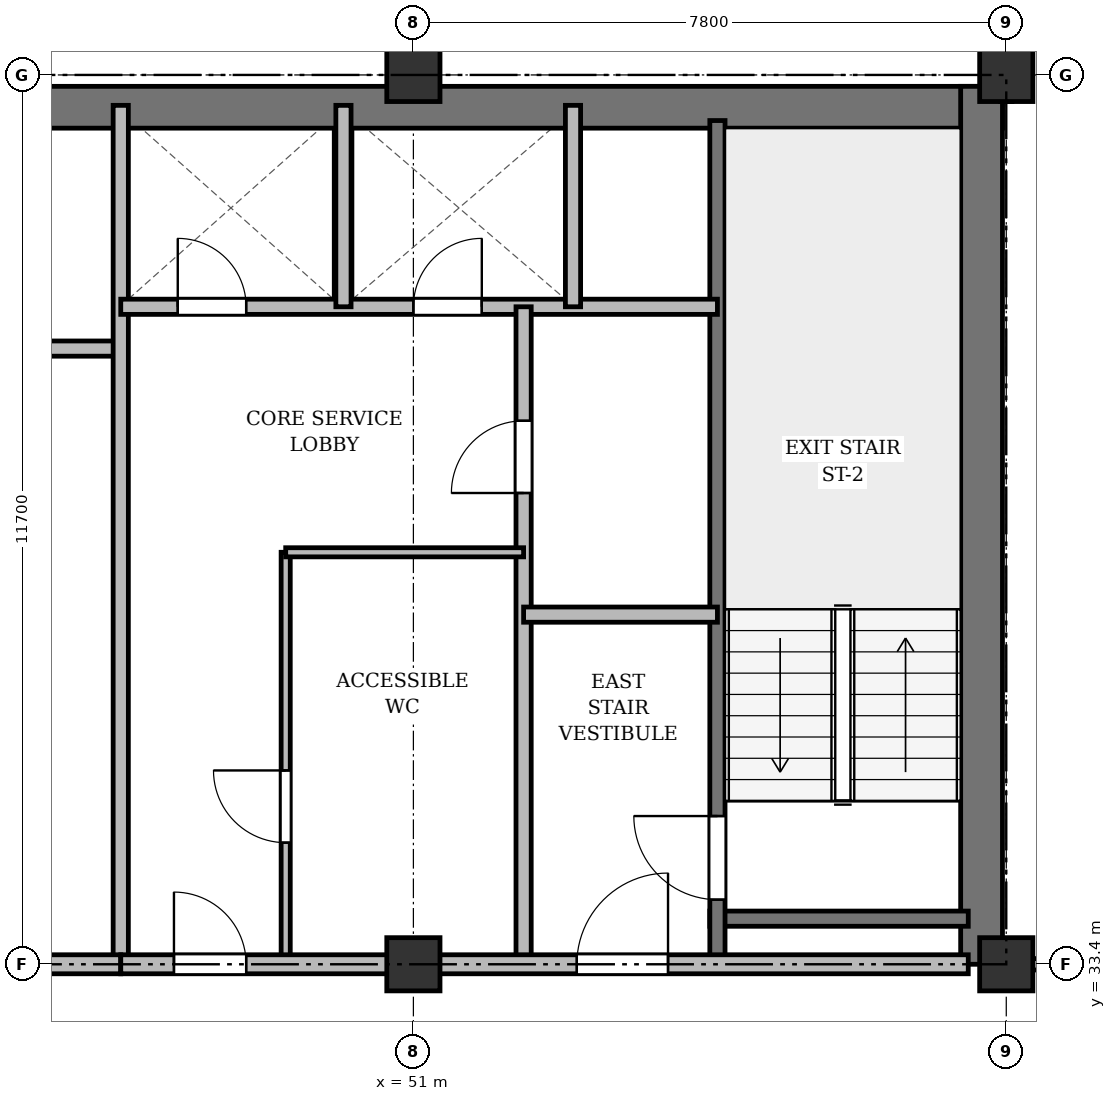
"""IFC4 building model, lengths in metres.
Left out: names, types, materials, properties, quantities, classifications, styles, units other than length and angle.
Written with IfcOpenShell. Run it as: python <this file> out.ifc"""

import sys

from ifc_helpers import new_model, si_unit, direction, frame, frame_2d, origin, origin_2d, place, context, subcontext, project, spatial, rectangle, extrude, source, transform, mapped, element, fill, save


model = new_model("IFC4")
c1 = context("Model", 3, precision=1e-05, world=origin(), true_north=direction((0.0, 1.0)))
c2 = subcontext(c1, "Body", "Model", "MODEL_VIEW")
j1 = project(units=[si_unit("LENGTHUNIT", "METRE"), si_unit("PLANEANGLEUNIT", "RADIAN")], contexts=[c1])
p1 = place(None, origin())
s1 = spatial("IfcSite", under=j1, at=p1, CompositionType="ELEMENT")
p2 = place(p1, origin())
s2 = spatial("IfcBuilding", under=s1, at=p2, CompositionType="ELEMENT")
p3 = place(p2, frame((0.0, 0.0, 146.5)))
s3 = spatial("IfcBuildingStorey", under=s2, at=p3, CompositionType="ELEMENT", Elevation=146.5)
m1 = source(origin(), c2, "Body", "SweptSolid", [
    extrude(rectangle(XDim=0.7, YDim=0.7, at=origin_2d()), origin(), (0.0, 0.0, 1.0), 3.6),
])
for number, where, z_axis, x_axis in (
    (1, (51.0, 33.4, 0.0), (0.0, 0.0, 1.0), (1.0, 0.0, 0.0)),
    (2, (51.0, 45.1, 0.0), (0.0, 0.0, 1.0), (1.0, 0.0, 0.0)),
    (3, (58.8, 33.4, 0.0), (0.0, 0.0, 1.0), (1.0, 0.0, 0.0)),
    (4, (58.8, 45.1, 0.0), (0.0, 0.0, 1.0), (1.0, 0.0, 0.0)),
):
    element("IfcColumn", number, at=place(p3, frame(where, z_axis=z_axis, x_axis=x_axis)), inside=s3, PredefinedType="COLUMN", context=c2, shape_type="MappedRepresentation", body=[
        mapped(m1, transform((0.0, 0.0, 0.0), x_axis=(1.0, 0.0, 0.0), y_axis=(0.0, 1.0, 0.0), z_axis=(0.0, 0.0, 1.0), scale=1.0)),
    ])
p4 = place(p3, frame((15.65, 44.675, 0.0), z_axis=(0.0, 0.0, 1.0), x_axis=(1.0, 0.0, 0.0)))
e5 = element("IfcWall", 5, at=p4, inside=s3, PredefinedType="SHEAR", context=c2, shape_type="SweptSolid", body=[
    extrude(rectangle(XDim=43.1, YDim=0.55, at=frame_2d((21.55, 0.0))), origin(), (0.0, 0.0, 1.0), 3.35),
])
p5 = place(p3, frame((58.475, 33.4, 0.0), z_axis=(0.0, 0.0, 1.0), x_axis=(0.0, 1.0, 0.0)))
e6 = element("IfcWall", 6, at=p5, inside=s3, PredefinedType="SHEAR", context=c2, shape_type="SweptSolid", body=[
    extrude(rectangle(XDim=11.55, YDim=0.55, at=frame_2d((5.775, 0.0))), origin(), (0.0, 0.0, 1.0), 3.35),
])
p6 = place(p3, frame((54.9, 34.0, 0.0), z_axis=(0.0, 0.0, 1.0), x_axis=(1.0, 0.0, 0.0)))
e7 = element("IfcWall", 7, at=p6, inside=s3, PredefinedType="SHEAR", context=c2, shape_type="SweptSolid", body=[
    extrude(rectangle(XDim=3.4, YDim=0.2, at=frame_2d((1.7, 0.0))), origin(), (0.0, 0.0, 1.0), 3.35),
])
p7 = place(p3, frame((55.0, 33.4, 0.0), z_axis=(0.0, 0.0, 1.0), x_axis=(0.0, 1.0, 0.0)))
e8 = element("IfcWall", 8, at=p7, inside=s3, PredefinedType="SHEAR", context=c2, shape_type="SweptSolid", body=[
    extrude(rectangle(XDim=11.1, YDim=0.2, at=frame_2d((5.55, 0.0))), origin(), (0.0, 0.0, 1.0), 3.35),
])
p8 = place(p7, frame((0.85, 0.0, 0.0)))
e9 = element("IfcOpeningElement", 9, at=p8, cuts=e8, PredefinedType="OPENING", context=c2, shape_type="SweptSolid", body=[
    extrude(rectangle(XDim=1.1, YDim=2.15, at=frame_2d((0.55, 1.075))), frame((0.0, 0.11, 0.0), z_axis=(0.0, -1.0, 0.0), x_axis=(1.0, 0.0, 0.0)), (0.0, 0.0, 1.0), 0.22),
])
p9 = place(p3, frame((40.25, 41.5, 0.0), z_axis=(0.0, 0.0, 1.0), x_axis=(1.0, 0.0, 0.0)))
e10 = element("IfcWall", 10, at=p9, inside=s3, PredefinedType="SOLIDWALL", context=c2, shape_type="SweptSolid", body=[
    extrude(rectangle(XDim=6.9, YDim=0.2, at=frame_2d((3.45, 0.0))), origin(), (0.0, 0.0, 1.0), 2.85),
])
p10 = place(p3, frame((47.15, 33.4, 0.0), z_axis=(0.0, 0.0, 1.0), x_axis=(0.0, 1.0, 0.0)))
e11 = element("IfcWall", 11, at=p10, inside=s3, PredefinedType="SOLIDWALL", context=c2, shape_type="SweptSolid", body=[
    extrude(rectangle(XDim=11.3, YDim=0.2, at=frame_2d((5.65, 0.0))), origin(), (0.0, 0.0, 1.0), 2.75),
])
p11 = place(p3, frame((33.3, 33.4, 0.0), z_axis=(0.0, 0.0, 1.0), x_axis=(1.0, 0.0, 0.0)))
e12 = element("IfcWall", 12, at=p11, inside=s3, PredefinedType="PARTITIONING", context=c2, shape_type="SweptSolid", body=[
    extrude(rectangle(XDim=13.85, YDim=0.25, at=frame_2d((6.925, 0.0))), origin(), (0.0, 0.0, 1.0), 2.75),
])
p12 = place(p11, frame((4.2, 0.0, 0.0)))
e13 = element("IfcOpeningElement", 13, at=p12, cuts=e12, PredefinedType="OPENING", context=c2, shape_type="SweptSolid", body=[
    extrude(rectangle(XDim=1.6, YDim=2.2, at=frame_2d((0.8, 1.1))), frame((0.0, 0.135, 0.0), z_axis=(0.0, -1.0, 0.0), x_axis=(1.0, 0.0, 0.0)), (0.0, 0.0, 1.0), 0.27),
])
p13 = place(p3, frame((47.15, 42.05, 0.0), z_axis=(0.0, 0.0, 1.0), x_axis=(1.0, 0.0, 0.0)))
e14 = element("IfcWall", 14, at=p13, inside=s3, PredefinedType="SOLIDWALL", context=c2, shape_type="SweptSolid", body=[
    extrude(rectangle(XDim=7.85, YDim=0.2, at=frame_2d((3.925, 0.0))), origin(), (0.0, 0.0, 1.0), 2.85),
])
p14 = place(p13, frame((0.75, 0.0, 0.0)))
e15 = element("IfcOpeningElement", 15, at=p14, cuts=e14, PredefinedType="OPENING", context=c2, shape_type="SweptSolid", body=[
    extrude(rectangle(XDim=0.9, YDim=2.1, at=frame_2d((0.45, 1.05))), frame((0.0, 0.11, 0.0), z_axis=(0.0, -1.0, 0.0), x_axis=(1.0, 0.0, 0.0)), (0.0, 0.0, 1.0), 0.22),
])
p15 = place(p13, frame((3.85, 0.0, 0.0)))
e16 = element("IfcOpeningElement", 16, at=p15, cuts=e14, PredefinedType="OPENING", context=c2, shape_type="SweptSolid", body=[
    extrude(rectangle(XDim=0.9, YDim=2.1, at=frame_2d((0.45, 1.05))), frame((0.0, 0.11, 0.0), z_axis=(0.0, -1.0, 0.0), x_axis=(1.0, 0.0, 0.0)), (0.0, 0.0, 1.0), 0.22),
])
for number, where, z_axis, x_axis in (
    (17, (50.08, 42.05, 0.0), (0.0, 0.0, 1.0), (0.0, 1.0, 0.0)),
    (18, (53.1, 42.05, 0.0), (0.0, 0.0, 1.0), (0.0, 1.0, 0.0)),
):
    element("IfcWall", number, at=place(p3, frame(where, z_axis=z_axis, x_axis=x_axis)), inside=s3, PredefinedType="SOLIDWALL", context=c2, shape_type="SweptSolid", body=[
        extrude(rectangle(XDim=2.65, YDim=0.2, at=frame_2d((1.325, 0.0))), origin(), (0.0, 0.0, 1.0), 3.35),
    ])
p16 = place(p3, frame((52.45, 33.4, 0.0), z_axis=(0.0, 0.0, 1.0), x_axis=(0.0, 1.0, 0.0)))
e19 = element("IfcWall", 19, at=p16, inside=s3, PredefinedType="PARTITIONING", context=c2, shape_type="SweptSolid", body=[
    extrude(rectangle(XDim=8.65, YDim=0.2, at=frame_2d((4.325, 0.0))), origin(), (0.0, 0.0, 1.0), 2.75),
])
p17 = place(p16, frame((6.2, 0.0, 0.0)))
e20 = element("IfcOpeningElement", 20, at=p17, cuts=e19, PredefinedType="OPENING", context=c2, shape_type="SweptSolid", body=[
    extrude(rectangle(XDim=0.95, YDim=2.15, at=frame_2d((0.475, 1.075))), frame((0.0, 0.11, 0.0), z_axis=(0.0, -1.0, 0.0), x_axis=(1.0, 0.0, 0.0)), (0.0, 0.0, 1.0), 0.22),
])
p18 = place(p3, frame((52.45, 38.0, 0.0), z_axis=(0.0, 0.0, 1.0), x_axis=(1.0, 0.0, 0.0)))
e21 = element("IfcWall", 21, at=p18, inside=s3, PredefinedType="PARTITIONING", context=c2, shape_type="SweptSolid", body=[
    extrude(rectangle(XDim=2.55, YDim=0.2, at=frame_2d((1.275, 0.0))), origin(), (0.0, 0.0, 1.0), 3.35),
])
p19 = place(p3, frame((49.32, 33.4, 0.0), z_axis=(0.0, 0.0, 1.0), x_axis=(0.0, 1.0, 0.0)))
e22 = element("IfcWall", 22, at=p19, inside=s3, PredefinedType="PARTITIONING", context=c2, shape_type="SweptSolid", body=[
    extrude(rectangle(XDim=5.42, YDim=0.12, at=frame_2d((2.71, 0.0))), origin(), (0.0, 0.0, 1.0), 2.75),
])
p20 = place(p19, frame((1.6, 0.0, 0.0)))
e23 = element("IfcOpeningElement", 23, at=p20, cuts=e22, PredefinedType="OPENING", context=c2, shape_type="SweptSolid", body=[
    extrude(rectangle(XDim=0.95, YDim=2.15, at=frame_2d((0.475, 1.075))), frame((0.0, 0.07, 0.0), z_axis=(0.0, -1.0, 0.0), x_axis=(1.0, 0.0, 0.0)), (0.0, 0.0, 1.0), 0.14),
])
p21 = place(p3, frame((49.32, 38.82, 0.0), z_axis=(0.0, 0.0, 1.0), x_axis=(1.0, 0.0, 0.0)))
e24 = element("IfcWall", 24, at=p21, inside=s3, PredefinedType="PARTITIONING", context=c2, shape_type="SweptSolid", body=[
    extrude(rectangle(XDim=3.13, YDim=0.12, at=frame_2d((1.565, 0.0))), origin(), (0.0, 0.0, 1.0), 2.85),
])
p22 = place(p3, frame((47.15, 33.4, 0.0), z_axis=(0.0, 0.0, 1.0), x_axis=(1.0, 0.0, 0.0)))
e25 = element("IfcWall", 25, at=p22, inside=s3, PredefinedType="PARTITIONING", context=c2, shape_type="SweptSolid", body=[
    extrude(rectangle(XDim=11.15, YDim=0.25, at=frame_2d((5.575, 0.0))), origin(), (0.0, 0.0, 1.0), 2.75),
])
p23 = place(p22, frame((0.7, 0.0, 0.0)))
e26 = element("IfcOpeningElement", 26, at=p23, cuts=e25, PredefinedType="OPENING", context=c2, shape_type="SweptSolid", body=[
    extrude(rectangle(XDim=0.95, YDim=2.15, at=frame_2d((0.475, 1.075))), frame((0.0, 0.135, 0.0), z_axis=(0.0, -1.0, 0.0), x_axis=(1.0, 0.0, 0.0)), (0.0, 0.0, 1.0), 0.27),
])
p24 = place(p22, frame((6.0, 0.0, 0.0)))
e27 = element("IfcOpeningElement", 27, at=p24, cuts=e25, PredefinedType="OPENING", context=c2, shape_type="SweptSolid", body=[
    extrude(rectangle(XDim=1.2, YDim=2.15, at=frame_2d((0.6, 1.075))), frame((0.0, 0.135, 0.0), z_axis=(0.0, -1.0, 0.0), x_axis=(1.0, 0.0, 0.0)), (0.0, 0.0, 1.0), 0.27),
])
p25 = place(p3, frame((58.8, 33.4, 0.0), z_axis=(0.0, 0.0, 1.0), x_axis=(1.0, 0.0, 0.0)))
e28 = element("IfcWall", 28, at=p25, inside=s3, PredefinedType="PARTITIONING", context=c2, shape_type="SweptSolid", body=[
    extrude(rectangle(XDim=7.55, YDim=0.15, at=frame_2d((3.775, 0.0))), origin(), (0.0, 0.0, 1.0), 2.75),
])
p26 = place(p25, frame((3.2, 0.0, 0.0)))
e29 = element("IfcOpeningElement", 29, at=p26, cuts=e28, PredefinedType="OPENING", context=c2, shape_type="SweptSolid", body=[
    extrude(rectangle(XDim=0.95, YDim=2.15, at=frame_2d((0.475, 1.075))), frame((0.0, 0.085, 0.0), z_axis=(0.0, -1.0, 0.0), x_axis=(1.0, 0.0, 0.0)), (0.0, 0.0, 1.0), 0.17),
])
p27 = place(p3, frame((58.8, 44.75, 0.0), z_axis=(0.0, 0.0, 1.0), x_axis=(0.0, 1.0, 0.0)))
e30 = element("IfcWall", 30, at=p27, inside=s3, PredefinedType="PARTITIONING", context=c2, shape_type="SweptSolid", body=[
    extrude(rectangle(XDim=3.61, YDim=0.15, at=frame_2d((1.805, 0.0))), origin(), (0.0, 0.0, 1.0), 2.85),
])
p28 = place(p27, frame((1.1, 0.0, 0.0)))
e31 = element("IfcOpeningElement", 31, at=p28, cuts=e30, PredefinedType="OPENING", context=c2, shape_type="SweptSolid", body=[
    extrude(rectangle(XDim=0.95, YDim=2.15, at=frame_2d((0.475, 1.075))), frame((0.0, 0.085, 0.0), z_axis=(0.0, -1.0, 0.0), x_axis=(1.0, 0.0, 0.0)), (0.0, 0.0, 1.0), 0.17),
])
m2 = source(origin(), c2, "Body", "SweptSolid", [
    extrude(rectangle(XDim=1.1, YDim=2.15, at=frame_2d((0.55, 1.075))), frame((0.0, 0.025, 0.0), z_axis=(0.0, -1.0, 0.0), x_axis=(1.0, 0.0, 0.0)), (0.0, 0.0, 1.0), 0.05),
])
p29 = place(p8, origin())
e32 = element("IfcDoor", 32, at=p29, inside=s3, OperationType="SINGLE_SWING_RIGHT", PredefinedType="DOOR", context=c2, shape_type="MappedRepresentation", body=[
    mapped(m2, transform((0.0, 0.0, 0.0), x_axis=(1.0, 0.0, 0.0), y_axis=(0.0, 1.0, 0.0), z_axis=(0.0, 0.0, 1.0), scale=1.0)),
])
fill(e9, e32)
m3 = source(origin(), c2, "Body", "SweptSolid", [
    extrude(rectangle(XDim=0.9, YDim=2.1, at=frame_2d((0.45, 1.05))), frame((0.0, 0.025, 0.0), z_axis=(0.0, -1.0, 0.0), x_axis=(1.0, 0.0, 0.0)), (0.0, 0.0, 1.0), 0.05),
])
p30 = place(p14, origin())
e33 = element("IfcDoor", 33, at=p30, inside=s3, OperationType="SINGLE_SWING_LEFT", PredefinedType="DOOR", context=c2, shape_type="MappedRepresentation", body=[
    mapped(m3, transform((0.0, 0.0, 0.0), x_axis=(1.0, 0.0, 0.0), y_axis=(0.0, 1.0, 0.0), z_axis=(0.0, 0.0, 1.0), scale=1.0)),
])
fill(e15, e33)
p31 = place(p15, origin())
e34 = element("IfcDoor", 34, at=p31, inside=s3, OperationType="SINGLE_SWING_RIGHT", PredefinedType="DOOR", context=c2, shape_type="MappedRepresentation", body=[
    mapped(m3, transform((0.0, 0.0, 0.0), x_axis=(1.0, 0.0, 0.0), y_axis=(0.0, 1.0, 0.0), z_axis=(0.0, 0.0, 1.0), scale=1.0)),
])
fill(e16, e34)
m4 = source(origin(), c2, "Body", "SweptSolid", [
    extrude(rectangle(XDim=0.95, YDim=2.15, at=frame_2d((0.475, 1.075))), frame((0.0, 0.025, 0.0), z_axis=(0.0, -1.0, 0.0), x_axis=(1.0, 0.0, 0.0)), (0.0, 0.0, 1.0), 0.05),
])
p32 = place(p17, origin())
e35 = element("IfcDoor", 35, at=p32, inside=s3, OperationType="SINGLE_SWING_LEFT", PredefinedType="DOOR", context=c2, shape_type="MappedRepresentation", body=[
    mapped(m4, transform((0.0, 0.0, 0.0), x_axis=(1.0, 0.0, 0.0), y_axis=(0.0, 1.0, 0.0), z_axis=(0.0, 0.0, 1.0), scale=1.0)),
])
fill(e20, e35)
p33 = place(p20, origin())
e36 = element("IfcDoor", 36, at=p33, inside=s3, OperationType="SINGLE_SWING_RIGHT", PredefinedType="DOOR", context=c2, shape_type="MappedRepresentation", body=[
    mapped(m4, transform((0.0, 0.0, 0.0), x_axis=(1.0, 0.0, 0.0), y_axis=(0.0, 1.0, 0.0), z_axis=(0.0, 0.0, 1.0), scale=1.0)),
])
fill(e23, e36)
p34 = place(p23, origin())
e37 = element("IfcDoor", 37, at=p34, inside=s3, OperationType="SINGLE_SWING_LEFT", PredefinedType="DOOR", context=c2, shape_type="MappedRepresentation", body=[
    mapped(m4, transform((0.0, 0.0, 0.0), x_axis=(1.0, 0.0, 0.0), y_axis=(0.0, 1.0, 0.0), z_axis=(0.0, 0.0, 1.0), scale=1.0)),
])
fill(e26, e37)
m5 = source(origin(), c2, "Body", "SweptSolid", [
    extrude(rectangle(XDim=1.2, YDim=2.15, at=frame_2d((0.6, 1.075))), frame((0.0, 0.025, 0.0), z_axis=(0.0, -1.0, 0.0), x_axis=(1.0, 0.0, 0.0)), (0.0, 0.0, 1.0), 0.05),
])
p35 = place(p24, origin())
e38 = element("IfcDoor", 38, at=p35, inside=s3, OperationType="SINGLE_SWING_RIGHT", PredefinedType="DOOR", context=c2, shape_type="MappedRepresentation", body=[
    mapped(m5, transform((0.0, 0.0, 0.0), x_axis=(1.0, 0.0, 0.0), y_axis=(0.0, 1.0, 0.0), z_axis=(0.0, 0.0, 1.0), scale=1.0)),
])
fill(e27, e38)
save(model, sys.argv[1])
